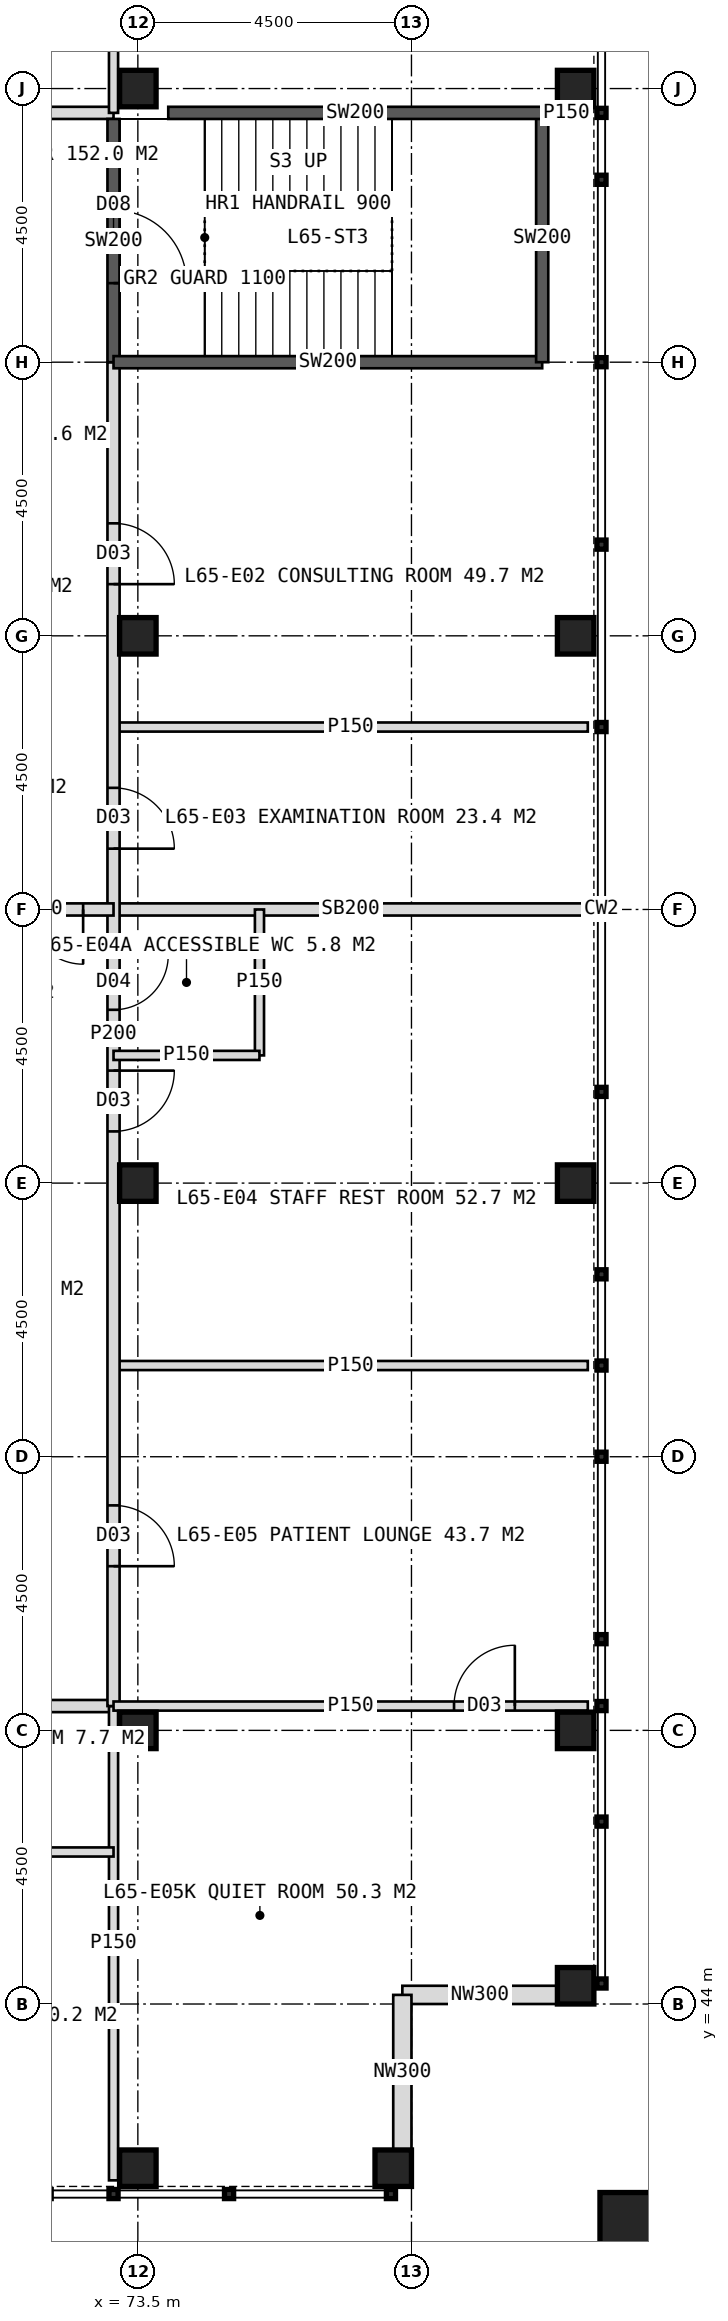
"""IFC4 building model, lengths in metres.
Left out: names, types, materials, properties, quantities, classifications, styles, units other than length and angle.
Written with IfcOpenShell. Run it as: python <this file> out.ifc"""

import sys

from ifc_helpers import new_model, si_unit, direction, frame, frame_2d, origin, origin_2d, place, context, subcontext, project, spatial, rectangle, hollow_rectangle, extrude, element, fill, save


model = new_model("IFC4")
c1 = context("Model", 3, precision=1e-05, world=origin(), true_north=direction((0.0, 1.0)))
c2 = subcontext(c1, "Body", "Model", "MODEL_VIEW")
j1 = project(units=[si_unit("LENGTHUNIT", "METRE"), si_unit("PLANEANGLEUNIT", "RADIAN")], contexts=[c1])
p1 = place(None, origin())
s1 = spatial("IfcSite", under=j1, at=p1, CompositionType="ELEMENT")
p2 = place(p1, origin())
s2 = spatial("IfcBuilding", under=s1, at=p2, CompositionType="ELEMENT")
p3 = place(p2, frame((0.0, 0.0, 270.0)))
s3 = spatial("IfcBuildingStorey", under=s2, at=p3, CompositionType="ELEMENT", Elevation=270.0)
for number, where, z_axis, x_axis in (
    (1, (73.5, 48.5, 0.0), (0.0, 0.0, 1.0), (1.0, 0.0, 0.0)),
    (2, (73.5, 75.5, 0.0), (0.0, 0.0, 1.0), (1.0, 0.0, 0.0)),
    (3, (73.5, 57.5, 0.0), (0.0, 0.0, 1.0), (1.0, 0.0, 0.0)),
    (4, (73.5, 66.5, 0.0), (0.0, 0.0, 1.0), (1.0, 0.0, 0.0)),
    (5, (80.7, 44.3, 0.0), (0.0, 0.0, 1.0), (1.0, 0.0, 0.0)),
    (6, (80.7, 48.5, 0.0), (0.0, 0.0, 1.0), (1.0, 0.0, 0.0)),
    (7, (80.7, 57.5, 0.0), (0.0, 0.0, 1.0), (1.0, 0.0, 0.0)),
    (8, (80.7, 66.5, 0.0), (0.0, 0.0, 1.0), (1.0, 0.0, 0.0)),
    (9, (73.5, 41.3, 0.0), (0.0, 0.0, 1.0), (1.0, 0.0, 0.0)),
    (10, (80.7, 75.5, 0.0), (0.0, 0.0, 1.0), (1.0, 0.0, 0.0)),
    (11, (77.7, 41.3, 0.0), (0.0, 0.0, 1.0), (1.0, 0.0, 0.0)),
):
    element("IfcColumn", number, at=place(p3, frame(where, z_axis=z_axis, x_axis=x_axis)), inside=s3, PredefinedType="COLUMN", context=c2, shape_type="SweptSolid", body=[
        extrude(hollow_rectangle(XDim=0.6, YDim=0.6, WallThickness=0.04, at=origin_2d()), origin(), (0.0, 0.0, 1.0), 4.0),
    ])
p4 = place(p3, frame((81.6, 40.4, 0.0), z_axis=(0.0, 0.0, 1.0), x_axis=(1.0, 0.0, 0.0)))
e12 = element("IfcColumn", 12, at=p4, inside=s3, PredefinedType="COLUMN", context=c2, shape_type="SweptSolid", body=[
    extrude(hollow_rectangle(XDim=1.0, YDim=1.0, WallThickness=0.06, at=origin_2d()), origin(), (0.0, 0.0, 1.0), 4.0),
])
for number, where, z_axis, x_axis in (
    (13, (80.4, 44.15, 0.0), (0.0, 0.0, 1.0), (-1.0, 0.0, 0.0)),
    (14, (77.85, 44.15, 0.0), (0.0, 0.0, 1.0), (0.0, -1.0, 0.0)),
):
    element("IfcWall", number, at=place(p3, frame(where, z_axis=z_axis, x_axis=x_axis)), inside=s3, PredefinedType="ELEMENTEDWALL", context=c2, shape_type="SweptSolid", body=[
        extrude(rectangle(XDim=2.55, YDim=0.3, at=frame_2d((1.275, 0.0))), origin(), (0.0, 0.0, 1.0), 2.95),
    ])
p5 = place(p3, frame((46.9, 75.1, 0.0), z_axis=(0.0, 0.0, 1.0), x_axis=(1.0, 0.0, 0.0)))
e15 = element("IfcWall", 15, at=p5, inside=s3, PredefinedType="PARTITIONING", context=c2, shape_type="SweptSolid", body=[
    extrude(rectangle(XDim=26.2, YDim=0.2, at=frame_2d((13.1, 0.0))), origin(), (0.0, 0.0, 1.0), 3.75),
])
p6 = place(p5, frame((1.75, 0.0, 0.0)))
e16 = element("IfcOpeningElement", 16, at=p6, cuts=e15, PredefinedType="OPENING", context=c2, shape_type="SweptSolid", body=[
    extrude(rectangle(XDim=1.2, YDim=2.2, at=frame_2d((0.6, 1.1))), frame((0.0, 0.11, 0.0), z_axis=(0.0, -1.0, 0.0), x_axis=(1.0, 0.0, 0.0)), (0.0, 0.0, 1.0), 0.22),
])
p7 = place(p5, frame((6.75, 0.0, 0.0)))
e17 = element("IfcOpeningElement", 17, at=p7, cuts=e15, PredefinedType="OPENING", context=c2, shape_type="SweptSolid", body=[
    extrude(rectangle(XDim=1.0, YDim=2.1, at=frame_2d((0.5, 1.05))), frame((0.0, 0.11, 0.0), z_axis=(0.0, -1.0, 0.0), x_axis=(1.0, 0.0, 0.0)), (0.0, 0.0, 1.0), 0.22),
])
p8 = place(p5, frame((11.1, 0.0, 0.0)))
e18 = element("IfcOpeningElement", 18, at=p8, cuts=e15, PredefinedType="OPENING", context=c2, shape_type="SweptSolid", body=[
    extrude(rectangle(XDim=1.0, YDim=2.1, at=frame_2d((0.5, 1.05))), frame((0.0, 0.11, 0.0), z_axis=(0.0, -1.0, 0.0), x_axis=(1.0, 0.0, 0.0)), (0.0, 0.0, 1.0), 0.22),
])
p9 = place(p5, frame((14.1, 0.0, 0.0)))
e19 = element("IfcOpeningElement", 19, at=p9, cuts=e15, PredefinedType="OPENING", context=c2, shape_type="SweptSolid", body=[
    extrude(rectangle(XDim=1.0, YDim=2.1, at=frame_2d((0.5, 1.05))), frame((0.0, 0.11, 0.0), z_axis=(0.0, -1.0, 0.0), x_axis=(1.0, 0.0, 0.0)), (0.0, 0.0, 1.0), 0.22),
])
p10 = place(p5, frame((18.45, 0.0, 0.0)))
e20 = element("IfcOpeningElement", 20, at=p10, cuts=e15, PredefinedType="OPENING", context=c2, shape_type="SweptSolid", body=[
    extrude(rectangle(XDim=1.0, YDim=2.1, at=frame_2d((0.5, 1.05))), frame((0.0, 0.11, 0.0), z_axis=(0.0, -1.0, 0.0), x_axis=(1.0, 0.0, 0.0)), (0.0, 0.0, 1.0), 0.22),
])
p11 = place(p5, frame((22.9, 0.0, 0.0)))
e21 = element("IfcOpeningElement", 21, at=p11, cuts=e15, PredefinedType="OPENING", context=c2, shape_type="SweptSolid", body=[
    extrude(rectangle(XDim=1.0, YDim=2.1, at=frame_2d((0.5, 1.05))), frame((0.0, 0.11, 0.0), z_axis=(0.0, -1.0, 0.0), x_axis=(1.0, 0.0, 0.0)), (0.0, 0.0, 1.0), 0.22),
])
p12 = place(p3, frame((73.1, 75.1, 0.0), z_axis=(0.0, 0.0, 1.0), x_axis=(0.0, 1.0, 0.0)))
e22 = element("IfcWall", 22, at=p12, inside=s3, PredefinedType="PARTITIONING", context=c2, shape_type="SweptSolid", body=[
    extrude(rectangle(XDim=7.8, YDim=0.15, at=frame_2d((3.9, 0.0))), origin(), (0.0, 0.0, 1.0), 3.75),
])
p13 = place(p12, frame((5.6, 0.0, 0.0)))
e23 = element("IfcOpeningElement", 23, at=p13, cuts=e22, PredefinedType="OPENING", context=c2, shape_type="SweptSolid", body=[
    extrude(rectangle(XDim=1.0, YDim=2.1, at=frame_2d((0.5, 1.05))), frame((0.0, 0.085, 0.0), z_axis=(0.0, -1.0, 0.0), x_axis=(1.0, 0.0, 0.0)), (0.0, 0.0, 1.0), 0.17),
])
p14 = place(p3, frame((73.1, 48.9, 0.0), z_axis=(0.0, 0.0, 1.0), x_axis=(-1.0, 0.0, 0.0)))
e24 = element("IfcWall", 24, at=p14, inside=s3, PredefinedType="PARTITIONING", context=c2, shape_type="SweptSolid", body=[
    extrude(rectangle(XDim=26.2, YDim=0.2, at=frame_2d((13.1, 0.0))), origin(), (0.0, 0.0, 1.0), 3.75),
])
p15 = place(p14, frame((1.75, 0.0, 0.0)))
e25 = element("IfcOpeningElement", 25, at=p15, cuts=e24, PredefinedType="OPENING", context=c2, shape_type="SweptSolid", body=[
    extrude(rectangle(XDim=1.2, YDim=2.2, at=frame_2d((0.6, 1.1))), frame((0.0, 0.11, 0.0), z_axis=(0.0, -1.0, 0.0), x_axis=(1.0, 0.0, 0.0)), (0.0, 0.0, 1.0), 0.22),
])
p16 = place(p14, frame((6.75, 0.0, 0.0)))
e26 = element("IfcOpeningElement", 26, at=p16, cuts=e24, PredefinedType="OPENING", context=c2, shape_type="SweptSolid", body=[
    extrude(rectangle(XDim=1.0, YDim=2.1, at=frame_2d((0.5, 1.05))), frame((0.0, 0.11, 0.0), z_axis=(0.0, -1.0, 0.0), x_axis=(1.0, 0.0, 0.0)), (0.0, 0.0, 1.0), 0.22),
])
p17 = place(p14, frame((12.75, 0.0, 0.0)))
e27 = element("IfcOpeningElement", 27, at=p17, cuts=e24, PredefinedType="OPENING", context=c2, shape_type="SweptSolid", body=[
    extrude(rectangle(XDim=1.2, YDim=2.2, at=frame_2d((0.6, 1.1))), frame((0.0, 0.11, 0.0), z_axis=(0.0, -1.0, 0.0), x_axis=(1.0, 0.0, 0.0)), (0.0, 0.0, 1.0), 0.22),
])
p18 = place(p14, frame((18.45, 0.0, 0.0)))
e28 = element("IfcOpeningElement", 28, at=p18, cuts=e24, PredefinedType="OPENING", context=c2, shape_type="SweptSolid", body=[
    extrude(rectangle(XDim=1.0, YDim=2.1, at=frame_2d((0.5, 1.05))), frame((0.0, 0.11, 0.0), z_axis=(0.0, -1.0, 0.0), x_axis=(1.0, 0.0, 0.0)), (0.0, 0.0, 1.0), 0.22),
])
p19 = place(p14, frame((22.9, 0.0, 0.0)))
e29 = element("IfcOpeningElement", 29, at=p19, cuts=e24, PredefinedType="OPENING", context=c2, shape_type="SweptSolid", body=[
    extrude(rectangle(XDim=1.0, YDim=2.1, at=frame_2d((0.5, 1.05))), frame((0.0, 0.11, 0.0), z_axis=(0.0, -1.0, 0.0), x_axis=(1.0, 0.0, 0.0)), (0.0, 0.0, 1.0), 0.22),
])
p20 = place(p3, frame((73.1, 48.9, 0.0), z_axis=(0.0, 0.0, 1.0), x_axis=(0.0, -1.0, 0.0)))
e30 = element("IfcWall", 30, at=p20, inside=s3, PredefinedType="PARTITIONING", context=c2, shape_type="SweptSolid", body=[
    extrude(rectangle(XDim=7.8, YDim=0.15, at=frame_2d((3.9, 0.0))), origin(), (0.0, 0.0, 1.0), 3.75),
])
p21 = place(p3, frame((73.1, 46.5, 0.0), z_axis=(0.0, 0.0, 1.0), x_axis=(-1.0, 0.0, 0.0)))
e31 = element("IfcWall", 31, at=p21, inside=s3, PredefinedType="PARTITIONING", context=c2, shape_type="SweptSolid", body=[
    extrude(rectangle(XDim=3.2, YDim=0.15, at=frame_2d((1.6, 0.0))), origin(), (0.0, 0.0, 1.0), 3.75),
])
p22 = place(p21, frame((1.75, 0.0, 0.0)))
e32 = element("IfcOpeningElement", 32, at=p22, cuts=e31, PredefinedType="OPENING", context=c2, shape_type="SweptSolid", body=[
    extrude(rectangle(XDim=1.2, YDim=2.2, at=frame_2d((0.6, 1.1))), frame((0.0, 0.085, 0.0), z_axis=(0.0, -1.0, 0.0), x_axis=(1.0, 0.0, 0.0)), (0.0, 0.0, 1.0), 0.17),
])
p23 = place(p3, frame((73.1, 65.0, 0.0), z_axis=(0.0, 0.0, 1.0), x_axis=(1.0, 0.0, 0.0)))
e33 = element("IfcWall", 33, at=p23, inside=s3, PredefinedType="PARTITIONING", context=c2, shape_type="SweptSolid", body=[
    extrude(rectangle(XDim=7.8, YDim=0.15, at=frame_2d((3.9, 0.0))), origin(), (0.0, 0.0, 1.0), 3.75),
])
p24 = place(p3, frame((73.1, 62.0, 0.0), z_axis=(0.0, 0.0, 1.0), x_axis=(1.0, 0.0, 0.0)))
e34 = element("IfcWall", 34, at=p24, inside=s3, PredefinedType="SOLIDWALL", context=c2, shape_type="SweptSolid", body=[
    extrude(rectangle(XDim=7.8, YDim=0.2, at=frame_2d((3.9, 0.0))), origin(), (0.0, 0.0, 1.0), 2.75),
])
p25 = place(p3, frame((73.1, 54.5, 0.0), z_axis=(0.0, 0.0, 1.0), x_axis=(1.0, 0.0, 0.0)))
e35 = element("IfcWall", 35, at=p25, inside=s3, PredefinedType="PARTITIONING", context=c2, shape_type="SweptSolid", body=[
    extrude(rectangle(XDim=7.8, YDim=0.15, at=frame_2d((3.9, 0.0))), origin(), (0.0, 0.0, 1.0), 3.75),
])
p26 = place(p3, frame((73.1, 71.0, 0.0), z_axis=(0.0, 0.0, 1.0), x_axis=(0.0, -1.0, 0.0)))
e36 = element("IfcWall", 36, at=p26, inside=s3, PredefinedType="PARTITIONING", context=c2, shape_type="SweptSolid", body=[
    extrude(rectangle(XDim=22.1, YDim=0.2, at=frame_2d((11.05, 0.0))), origin(), (0.0, 0.0, 1.0), 3.75),
])
p27 = place(p26, frame((2.65, 0.0, 0.0)))
e37 = element("IfcOpeningElement", 37, at=p27, cuts=e36, PredefinedType="OPENING", context=c2, shape_type="SweptSolid", body=[
    extrude(rectangle(XDim=1.0, YDim=2.1, at=frame_2d((0.5, 1.05))), frame((0.0, 0.11, 0.0), z_axis=(0.0, -1.0, 0.0), x_axis=(1.0, 0.0, 0.0)), (0.0, 0.0, 1.0), 0.22),
])
p28 = place(p26, frame((7.0, 0.0, 0.0)))
e38 = element("IfcOpeningElement", 38, at=p28, cuts=e36, PredefinedType="OPENING", context=c2, shape_type="SweptSolid", body=[
    extrude(rectangle(XDim=1.0, YDim=2.1, at=frame_2d((0.5, 1.05))), frame((0.0, 0.11, 0.0), z_axis=(0.0, -1.0, 0.0), x_axis=(1.0, 0.0, 0.0)), (0.0, 0.0, 1.0), 0.22),
])
p29 = place(p26, frame((9.75, 0.0, 0.0)))
e39 = element("IfcOpeningElement", 39, at=p29, cuts=e36, PredefinedType="OPENING", context=c2, shape_type="SweptSolid", body=[
    extrude(rectangle(XDim=0.9, YDim=2.1, at=frame_2d((0.45, 1.05))), frame((0.0, 0.11, 0.0), z_axis=(0.0, -1.0, 0.0), x_axis=(1.0, 0.0, 0.0)), (0.0, 0.0, 1.0), 0.22),
])
p30 = place(p26, frame((11.65, 0.0, 0.0)))
e40 = element("IfcOpeningElement", 40, at=p30, cuts=e36, PredefinedType="OPENING", context=c2, shape_type="SweptSolid", body=[
    extrude(rectangle(XDim=1.0, YDim=2.1, at=frame_2d((0.5, 1.05))), frame((0.0, 0.11, 0.0), z_axis=(0.0, -1.0, 0.0), x_axis=(1.0, 0.0, 0.0)), (0.0, 0.0, 1.0), 0.22),
])
p31 = place(p26, frame((18.8, 0.0, 0.0)))
e41 = element("IfcOpeningElement", 41, at=p31, cuts=e36, PredefinedType="OPENING", context=c2, shape_type="SweptSolid", body=[
    extrude(rectangle(XDim=1.0, YDim=2.1, at=frame_2d((0.5, 1.05))), frame((0.0, 0.11, 0.0), z_axis=(0.0, -1.0, 0.0), x_axis=(1.0, 0.0, 0.0)), (0.0, 0.0, 1.0), 0.22),
])
p32 = place(p3, frame((80.2, 75.1, 0.0), z_axis=(0.0, 0.0, 1.0), x_axis=(1.0, 0.0, 0.0)))
e42 = element("IfcWall", 42, at=p32, inside=s3, PredefinedType="PARTITIONING", context=c2, shape_type="SweptSolid", body=[
    extrude(rectangle(XDim=0.7, YDim=0.15, at=frame_2d((0.35, 0.0))), origin(), (0.0, 0.0, 1.0), 3.75),
])
for number, where, z_axis, x_axis in (
    (43, (75.5, 62.0, 0.0), (0.0, 0.0, 1.0), (0.0, -1.0, 0.0)),
    (44, (73.1, 59.6, 0.0), (0.0, 0.0, 1.0), (1.0, 0.0, 0.0)),
):
    element("IfcWall", number, at=place(p3, frame(where, z_axis=z_axis, x_axis=x_axis)), inside=s3, PredefinedType="PARTITIONING", context=c2, shape_type="SweptSolid", body=[
        extrude(rectangle(XDim=2.4, YDim=0.15, at=frame_2d((1.2, 0.0))), origin(), (0.0, 0.0, 1.0), 3.75),
    ])
p33 = place(p3, frame((73.1, 48.9, 0.0), z_axis=(0.0, 0.0, 1.0), x_axis=(1.0, 0.0, 0.0)))
e45 = element("IfcWall", 45, at=p33, inside=s3, PredefinedType="PARTITIONING", context=c2, shape_type="SweptSolid", body=[
    extrude(rectangle(XDim=7.8, YDim=0.15, at=frame_2d((3.9, 0.0))), origin(), (0.0, 0.0, 1.0), 3.75),
])
p34 = place(p33, frame((5.6, 0.0, 0.0)))
e46 = element("IfcOpeningElement", 46, at=p34, cuts=e45, PredefinedType="OPENING", context=c2, shape_type="SweptSolid", body=[
    extrude(rectangle(XDim=1.0, YDim=2.1, at=frame_2d((0.5, 1.05))), frame((0.0, 0.085, 0.0), z_axis=(0.0, -1.0, 0.0), x_axis=(1.0, 0.0, 0.0)), (0.0, 0.0, 1.0), 0.17),
])
p35 = place(p3, frame((70.5, 62.0, 0.0), z_axis=(0.0, 0.0, 1.0), x_axis=(1.0, 0.0, 0.0)))
e47 = element("IfcWall", 47, at=p35, inside=s3, PredefinedType="SOLIDWALL", context=c2, shape_type="SweptSolid", body=[
    extrude(rectangle(XDim=2.6, YDim=0.2, at=frame_2d((1.3, 0.0))), origin(), (0.0, 0.0, 1.0), 2.75),
])
p36 = place(p35, frame((0.3, 0.0, 0.0)))
e48 = element("IfcOpeningElement", 48, at=p36, cuts=e47, PredefinedType="OPENING", context=c2, shape_type="SweptSolid", body=[
    extrude(rectangle(XDim=1.8, YDim=2.2, at=frame_2d((0.9, 1.1))), frame((0.0, 0.11, 0.0), z_axis=(0.0, -1.0, 0.0), x_axis=(1.0, 0.0, 0.0)), (0.0, 0.0, 1.0), 0.22),
])
p37 = place(p3, frame((73.1, 75.0, 0.0), z_axis=(0.0, 0.0, 1.0), x_axis=(0.0, -1.0, 0.0)))
e49 = element("IfcWall", 49, at=p37, inside=s3, PredefinedType="SOLIDWALL", context=c2, shape_type="SweptSolid", body=[
    extrude(rectangle(XDim=4.0, YDim=0.2, at=frame_2d((2.0, 0.0))), origin(), (0.0, 0.0, 1.0), 3.75),
])
p38 = place(p37, frame((1.5, 0.0, 0.0)))
e50 = element("IfcOpeningElement", 50, at=p38, cuts=e49, PredefinedType="OPENING", context=c2, shape_type="SweptSolid", body=[
    extrude(rectangle(XDim=1.2, YDim=2.1, at=frame_2d((0.6, 1.05))), frame((0.0, 0.11, 0.0), z_axis=(0.0, -1.0, 0.0), x_axis=(1.0, 0.0, 0.0)), (0.0, 0.0, 1.0), 0.22),
])
p39 = place(p3, frame((73.1, 71.0, 0.0), z_axis=(0.0, 0.0, 1.0), x_axis=(1.0, 0.0, 0.0)))
e51 = element("IfcWall", 51, at=p39, inside=s3, PredefinedType="SOLIDWALL", context=c2, shape_type="SweptSolid", body=[
    extrude(rectangle(XDim=7.05, YDim=0.2, at=frame_2d((3.525, 0.0))), origin(), (0.0, 0.0, 1.0), 3.75),
])
p40 = place(p3, frame((80.15, 71.0, 0.0), z_axis=(0.0, 0.0, 1.0), x_axis=(0.0, 1.0, 0.0)))
e52 = element("IfcWall", 52, at=p40, inside=s3, PredefinedType="SOLIDWALL", context=c2, shape_type="SweptSolid", body=[
    extrude(rectangle(XDim=4.1, YDim=0.2, at=frame_2d((2.05, 0.0))), origin(), (0.0, 0.0, 1.0), 3.75),
])
p41 = place(p3, frame((74.0, 75.1, 0.0), z_axis=(0.0, 0.0, 1.0), x_axis=(1.0, 0.0, 0.0)))
e53 = element("IfcWall", 53, at=p41, inside=s3, PredefinedType="SOLIDWALL", context=c2, shape_type="SweptSolid", body=[
    extrude(rectangle(XDim=6.15, YDim=0.2, at=frame_2d((3.075, 0.0))), origin(), (0.0, 0.0, 1.0), 3.75),
])
p42 = place(p27, origin())
e54 = element("IfcDoor", 54, at=p42, inside=s3, OperationType="SINGLE_SWING_RIGHT", PredefinedType="DOOR", context=c2, shape_type="SweptSolid", body=[
    extrude(rectangle(XDim=1.0, YDim=2.1, at=frame_2d((0.5, 1.05))), frame((0.0, 0.025, 0.0), z_axis=(0.0, -1.0, 0.0), x_axis=(1.0, 0.0, 0.0)), (0.0, 0.0, 1.0), 0.05),
])
fill(e37, e54)
p43 = place(p28, origin())
e55 = element("IfcDoor", 55, at=p43, inside=s3, OperationType="SINGLE_SWING_RIGHT", PredefinedType="DOOR", context=c2, shape_type="SweptSolid", body=[
    extrude(rectangle(XDim=1.0, YDim=2.1, at=frame_2d((0.5, 1.05))), frame((0.0, 0.025, 0.0), z_axis=(0.0, -1.0, 0.0), x_axis=(1.0, 0.0, 0.0)), (0.0, 0.0, 1.0), 0.05),
])
fill(e38, e55)
p44 = place(p29, origin())
e56 = element("IfcDoor", 56, at=p44, inside=s3, OperationType="SINGLE_SWING_LEFT", PredefinedType="DOOR", context=c2, shape_type="SweptSolid", body=[
    extrude(rectangle(XDim=0.9, YDim=2.1, at=frame_2d((0.45, 1.05))), frame((0.0, 0.025, 0.0), z_axis=(0.0, -1.0, 0.0), x_axis=(1.0, 0.0, 0.0)), (0.0, 0.0, 1.0), 0.05),
])
fill(e39, e56)
p45 = place(p30, origin())
e57 = element("IfcDoor", 57, at=p45, inside=s3, OperationType="SINGLE_SWING_LEFT", PredefinedType="DOOR", context=c2, shape_type="SweptSolid", body=[
    extrude(rectangle(XDim=1.0, YDim=2.1, at=frame_2d((0.5, 1.05))), frame((0.0, 0.025, 0.0), z_axis=(0.0, -1.0, 0.0), x_axis=(1.0, 0.0, 0.0)), (0.0, 0.0, 1.0), 0.05),
])
fill(e40, e57)
p46 = place(p34, origin())
e58 = element("IfcDoor", 58, at=p46, inside=s3, OperationType="SINGLE_SWING_RIGHT", PredefinedType="DOOR", context=c2, shape_type="SweptSolid", body=[
    extrude(rectangle(XDim=1.0, YDim=2.1, at=frame_2d((0.5, 1.05))), frame((0.0, 0.025, 0.0), z_axis=(0.0, -1.0, 0.0), x_axis=(1.0, 0.0, 0.0)), (0.0, 0.0, 1.0), 0.05),
])
fill(e46, e58)
p47 = place(p31, origin())
e59 = element("IfcDoor", 59, at=p47, inside=s3, OperationType="SINGLE_SWING_RIGHT", PredefinedType="DOOR", context=c2, shape_type="SweptSolid", body=[
    extrude(rectangle(XDim=1.0, YDim=2.1, at=frame_2d((0.5, 1.05))), frame((0.0, 0.025, 0.0), z_axis=(0.0, -1.0, 0.0), x_axis=(1.0, 0.0, 0.0)), (0.0, 0.0, 1.0), 0.05),
])
fill(e41, e59)
p48 = place(p36, origin())
e60 = element("IfcDoor", 60, at=p48, inside=s3, OperationType="DOUBLE_DOOR_DOUBLE_SWING", PredefinedType="DOOR", context=c2, shape_type="SweptSolid", body=[
    extrude(rectangle(XDim=1.8, YDim=2.2, at=frame_2d((0.9, 1.1))), frame((0.0, 0.025, 0.0), z_axis=(0.0, -1.0, 0.0), x_axis=(1.0, 0.0, 0.0)), (0.0, 0.0, 1.0), 0.05),
])
fill(e48, e60)
p49 = place(p38, origin())
e61 = element("IfcDoor", 61, at=p49, inside=s3, OperationType="SINGLE_SWING_RIGHT", PredefinedType="DOOR", context=c2, shape_type="SweptSolid", body=[
    extrude(rectangle(XDim=1.2, YDim=2.1, at=frame_2d((0.6, 1.05))), frame((0.0, 0.025, 0.0), z_axis=(0.0, -1.0, 0.0), x_axis=(1.0, 0.0, 0.0)), (0.0, 0.0, 1.0), 0.05),
])
fill(e50, e61)
save(model, sys.argv[1])
